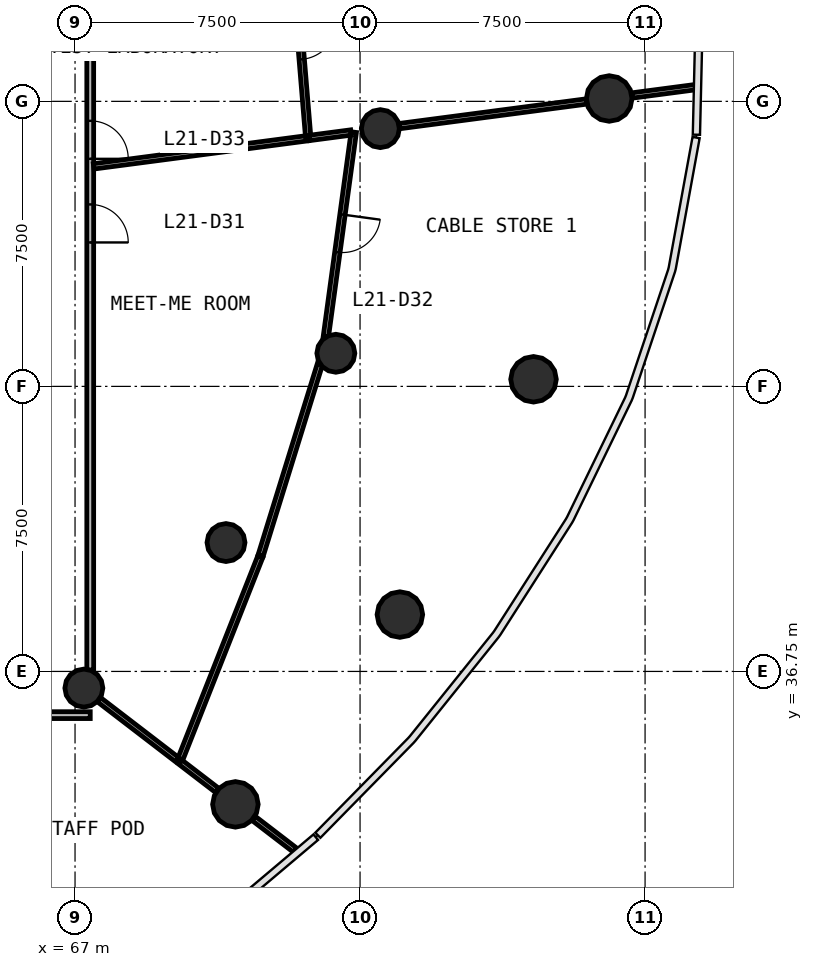
"""IFC4 building model, lengths in metres.
Left out: names, types, materials, properties, quantities, classifications, styles, units other than length and angle.
Written with IfcOpenShell. Run it as: python <this file> out.ifc"""

import sys

from ifc_helpers import new_model, si_unit, direction, frame, frame_2d, origin, origin_2d, place, context, subcontext, project, spatial, rectangle, circle, extrude, source, transform, mapped, element, fill, save


model = new_model("IFC4")
c1 = context("Model", 3, precision=1e-05, world=origin(), true_north=direction((0.0, 1.0)))
c2 = subcontext(c1, "Body", "Model", "MODEL_VIEW")
j1 = project(units=[si_unit("LENGTHUNIT", "METRE"), si_unit("PLANEANGLEUNIT", "RADIAN")], contexts=[c1])
p1 = place(None, origin())
s1 = spatial("IfcSite", under=j1, at=p1, CompositionType="ELEMENT")
p2 = place(p1, origin())
s2 = spatial("IfcBuilding", under=s1, at=p2, CompositionType="ELEMENT")
p3 = place(p2, frame((0.0, 0.0, 92.1)))
s3 = spatial("IfcBuildingStorey", under=s2, at=p3, CompositionType="ELEMENT", Elevation=92.1)
m1 = source(origin(), c2, "Body", "SweptSolid", [
    extrude(circle(Radius=0.6, at=origin_2d()), origin(), (0.0, 0.0, 1.0), 4.1),
])
for number, where, z_axis, x_axis in (
    (1, (81.056, 51.825, 0.0), (0.0, 0.0, 1.0), (1.0, 0.0, 0.0)),
    (2, (71.22, 33.252, 0.0), (0.0, 0.0, 1.0), (1.0, 0.0, 0.0)),
    (3, (75.548, 38.246, 0.0), (0.0, 0.0, 1.0), (1.0, 0.0, 0.0)),
    (4, (79.064, 44.437, 0.0), (0.0, 0.0, 1.0), (1.0, 0.0, 0.0)),
):
    element("IfcColumn", number, at=place(p3, frame(where, z_axis=z_axis, x_axis=x_axis)), inside=s3, PredefinedType="COLUMN", context=c2, shape_type="MappedRepresentation", body=[
        mapped(m1, transform((0.0, 0.0, 0.0), scale=1.0)),
    ])
m2 = source(origin(), c2, "Body", "SweptSolid", [
    extrude(circle(Radius=0.5, at=origin_2d()), origin(), (0.0, 0.0, 1.0), 4.1),
])
for number, where, z_axis, x_axis in (
    (5, (75.034, 51.032, 0.0), (0.0, 0.0, 1.0), (1.0, 0.0, 0.0)),
    (6, (67.232, 36.312, 0.0), (0.0, 0.0, 1.0), (1.0, 0.0, 0.0)),
    (7, (70.972, 40.141, 0.0), (0.0, 0.0, 1.0), (1.0, 0.0, 0.0)),
    (8, (73.863, 45.122, 0.0), (0.0, 0.0, 1.0), (1.0, 0.0, 0.0)),
):
    element("IfcColumn", number, at=place(p3, frame(where, z_axis=z_axis, x_axis=x_axis)), inside=s3, PredefinedType="COLUMN", context=c2, shape_type="MappedRepresentation", body=[
        mapped(m2, transform((0.0, 0.0, 0.0), scale=1.0)),
    ])
p4 = place(p3, frame((67.4, 35.6, 0.0), z_axis=(0.0, 0.0, 1.0), x_axis=(-1.0, 0.0, 0.0)))
e9 = element("IfcWall", 9, at=p4, inside=s3, PredefinedType="PARTITIONING", context=c2, shape_type="SweptSolid", body=[
    extrude(rectangle(XDim=30.8, YDim=0.18, at=frame_2d((15.4, 0.0))), origin(), (0.0, 0.0, 1.0), 2.9),
])
p5 = place(p4, frame((22.25, 0.0, 0.0)))
e10 = element("IfcOpeningElement", 10, at=p5, cuts=e9, PredefinedType="OPENING", context=c2, shape_type="SweptSolid", body=[
    extrude(rectangle(XDim=0.9, YDim=2.1, at=frame_2d((0.45, 1.05))), frame((0.0, 0.1, 0.0), z_axis=(0.0, -1.0, 0.0), x_axis=(1.0, 0.0, 0.0)), (0.0, 0.0, 1.0), 0.2),
])
p6 = place(p4, frame((19.65, 0.0, 0.0)))
e11 = element("IfcOpeningElement", 11, at=p6, cuts=e9, PredefinedType="OPENING", context=c2, shape_type="SweptSolid", body=[
    extrude(rectangle(XDim=0.9, YDim=2.1, at=frame_2d((0.45, 1.05))), frame((0.0, 0.1, 0.0), z_axis=(0.0, -1.0, 0.0), x_axis=(1.0, 0.0, 0.0)), (0.0, 0.0, 1.0), 0.2),
])
p7 = place(p4, frame((17.25, 0.0, 0.0)))
e12 = element("IfcOpeningElement", 12, at=p7, cuts=e9, PredefinedType="OPENING", context=c2, shape_type="SweptSolid", body=[
    extrude(rectangle(XDim=0.9, YDim=2.1, at=frame_2d((0.45, 1.05))), frame((0.0, 0.1, 0.0), z_axis=(0.0, -1.0, 0.0), x_axis=(1.0, 0.0, 0.0)), (0.0, 0.0, 1.0), 0.2),
])
p8 = place(p4, frame((14.95, 0.0, 0.0)))
e13 = element("IfcOpeningElement", 13, at=p8, cuts=e9, PredefinedType="OPENING", context=c2, shape_type="SweptSolid", body=[
    extrude(rectangle(XDim=1.0, YDim=2.1, at=frame_2d((0.5, 1.05))), frame((0.0, 0.1, 0.0), z_axis=(0.0, -1.0, 0.0), x_axis=(1.0, 0.0, 0.0)), (0.0, 0.0, 1.0), 0.2),
])
p9 = place(p4, frame((4.35, 0.0, 0.0)))
e14 = element("IfcOpeningElement", 14, at=p9, cuts=e9, PredefinedType="OPENING", context=c2, shape_type="SweptSolid", body=[
    extrude(rectangle(XDim=1.0, YDim=2.1, at=frame_2d((0.5, 1.05))), frame((0.0, 0.1, 0.0), z_axis=(0.0, -1.0, 0.0), x_axis=(1.0, 0.0, 0.0)), (0.0, 0.0, 1.0), 0.2),
])
p10 = place(p3, frame((67.4, 60.37, 0.0), z_axis=(0.0, 0.0, 1.0), x_axis=(0.0, -1.0, 0.0)))
e15 = element("IfcWall", 15, at=p10, inside=s3, PredefinedType="PARTITIONING", context=c2, shape_type="SweptSolid", body=[
    extrude(rectangle(XDim=23.583, YDim=0.18, at=frame_2d((11.791, 0.0))), origin(), (0.0, 0.0, 1.0), 2.9),
])
p11 = place(p10, frame((11.333, 0.0, 0.0)))
e16 = element("IfcOpeningElement", 16, at=p11, cuts=e15, PredefinedType="OPENING", context=c2, shape_type="SweptSolid", body=[
    extrude(rectangle(XDim=1.0, YDim=2.1, at=frame_2d((0.5, 1.05))), frame((0.0, 0.1, 0.0), z_axis=(0.0, -1.0, 0.0), x_axis=(1.0, 0.0, 0.0)), (0.0, 0.0, 1.0), 0.2),
])
p12 = place(p10, frame((9.133, 0.0, 0.0)))
e17 = element("IfcOpeningElement", 17, at=p12, cuts=e15, PredefinedType="OPENING", context=c2, shape_type="SweptSolid", body=[
    extrude(rectangle(XDim=1.0, YDim=2.1, at=frame_2d((0.5, 1.05))), frame((0.0, 0.1, 0.0), z_axis=(0.0, -1.0, 0.0), x_axis=(1.0, 0.0, 0.0)), (0.0, 0.0, 1.0), 0.2),
])
p13 = place(p3, frame((69.747, 34.382, 0.0), z_axis=(0.0, 0.0, 1.0), x_axis=(0.367316282509, 0.930096096435, 0.0)))
e18 = element("IfcWall", 18, at=p13, inside=s3, PredefinedType="PARTITIONING", context=c2, shape_type="SweptSolid", body=[
    extrude(rectangle(XDim=5.791, YDim=0.14, at=frame_2d((2.895, 0.0))), origin(), (0.0, 0.0, 1.0), 2.9),
])
p14 = place(p3, frame((67.49, 50.039, 0.0), z_axis=(0.0, 0.0, 1.0), x_axis=(0.99144553959, 0.130521040556, 0.0)))
e19 = element("IfcWall", 19, at=p14, inside=s3, PredefinedType="PARTITIONING", context=c2, shape_type="SweptSolid", body=[
    extrude(rectangle(XDim=5.696, YDim=0.14, at=frame_2d((2.848, 0.0))), origin(), (0.0, 0.0, 1.0), 2.9),
])
p15 = place(p3, frame((74.334, 50.94, 0.0), z_axis=(0.0, 0.0, 1.0), x_axis=(-0.135203344836, -0.990817872036, 0.0)))
e20 = element("IfcWall", 20, at=p15, inside=s3, PredefinedType="PARTITIONING", context=c2, shape_type="SweptSolid", body=[
    extrude(rectangle(XDim=5.439, YDim=0.14, at=frame_2d((2.719, 0.0))), origin(), (0.0, 0.0, 1.0), 2.9),
])
p16 = place(p15, frame((2.189, 0.0, 0.0)))
e21 = element("IfcOpeningElement", 21, at=p16, cuts=e20, PredefinedType="OPENING", context=c2, shape_type="SweptSolid", body=[
    extrude(rectangle(XDim=1.0, YDim=2.1, at=frame_2d((0.5, 1.05))), frame((0.0, 0.08, 0.0), z_axis=(0.0, -1.0, 0.0), x_axis=(1.0, 0.0, 0.0)), (0.0, 0.0, 1.0), 0.16),
])
p17 = place(p3, frame((71.883, 39.796, 0.0), z_axis=(0.0, 0.0, 1.0), x_axis=(0.296009313484, 0.955185053448, 0.0)))
e22 = element("IfcWall", 22, at=p17, inside=s3, PredefinedType="PARTITIONING", context=c2, shape_type="SweptSolid", body=[
    extrude(rectangle(XDim=5.279, YDim=0.14, at=frame_2d((2.639, 0.0))), origin(), (0.0, 0.0, 1.0), 2.9),
])
p18 = place(p3, frame((72.7, 56.048, 0.0), z_axis=(0.0, 0.0, 1.0), x_axis=(0.082672421763, -0.996576776109, 0.0)))
e23 = element("IfcWall", 23, at=p18, inside=s3, PredefinedType="PARTITIONING", context=c2, shape_type="SweptSolid", body=[
    extrude(rectangle(XDim=5.254, YDim=0.14, at=frame_2d((2.627, 0.0))), origin(), (0.0, 0.0, 1.0), 2.9),
])
p19 = place(p18, frame((2.204, 0.0, 0.0)))
e24 = element("IfcOpeningElement", 24, at=p19, cuts=e23, PredefinedType="OPENING", context=c2, shape_type="SweptSolid", body=[
    extrude(rectangle(XDim=1.0, YDim=2.1, at=frame_2d((0.5, 1.05))), frame((0.0, 0.08, 0.0), z_axis=(0.0, -1.0, 0.0), x_axis=(1.0, 0.0, 0.0)), (0.0, 0.0, 1.0), 0.16),
])
p20 = place(p3, frame((75.534, 51.098, 0.0), z_axis=(0.0, 0.0, 1.0), x_axis=(0.991443414541, 0.130537181533, 0.0)))
e25 = element("IfcWall", 25, at=p20, inside=s3, PredefinedType="PARTITIONING", context=c2, shape_type="SweptSolid", body=[
    extrude(rectangle(XDim=4.966, YDim=0.14, at=frame_2d((2.483, 0.0))), origin(), (0.0, 0.0, 1.0), 2.9),
])
p21 = place(p3, frame((67.633, 36.005, 0.0), z_axis=(0.0, 0.0, 1.0), x_axis=(0.793386534399, -0.608718167164, 0.0)))
e26 = element("IfcWall", 26, at=p21, inside=s3, PredefinedType="PARTITIONING", context=c2, shape_type="SweptSolid", body=[
    extrude(rectangle(XDim=2.593, YDim=0.14, at=frame_2d((1.296, 0.0))), origin(), (0.0, 0.0, 1.0), 2.9),
])
p22 = place(p3, frame((81.656, 51.904, 0.0), z_axis=(0.0, 0.0, 1.0), x_axis=(0.991450373449, 0.130484317017, 0.0)))
e27 = element("IfcWall", 27, at=p22, inside=s3, PredefinedType="PARTITIONING", context=c2, shape_type="SweptSolid", body=[
    extrude(rectangle(XDim=1.695, YDim=0.14, at=frame_2d((0.848, 0.0))), origin(), (0.0, 0.0, 1.0), 2.9),
])
p23 = place(p3, frame((71.699, 32.884, 0.0), z_axis=(0.0, 0.0, 1.0), x_axis=(0.793327210849, -0.608795480047, 0.0)))
e28 = element("IfcWall", 28, at=p23, inside=s3, PredefinedType="PARTITIONING", context=c2, shape_type="SweptSolid", body=[
    extrude(rectangle(XDim=1.38, YDim=0.14, at=frame_2d((0.69, 0.0))), origin(), (0.0, 0.0, 1.0), 2.9),
])
p24 = place(p3, frame((69.771, 34.364, 0.0), z_axis=(0.0, 0.0, 1.0), x_axis=(0.793284637014, -0.608850954403, 0.0)))
e29 = element("IfcWall", 29, at=p24, inside=s3, PredefinedType="PARTITIONING", context=c2, shape_type="SweptSolid", body=[
    extrude(rectangle(XDim=1.222, YDim=0.14, at=frame_2d((0.611, 0.0))), origin(), (0.0, 0.0, 1.0), 2.9),
])
p25 = place(p3, frame((73.167, 50.787, 0.0), z_axis=(0.0, 0.0, 1.0), x_axis=(0.991440755943, 0.130557372273, 0.0)))
e30 = element("IfcWall", 30, at=p25, inside=s3, PredefinedType="PARTITIONING", context=c2, shape_type="SweptSolid", body=[
    extrude(rectangle(XDim=1.105, YDim=0.14, at=frame_2d((0.553, 0.0))), origin(), (0.0, 0.0, 1.0), 2.9),
])
m3 = source(origin(), c2, "Body", "SweptSolid", [
    extrude(rectangle(XDim=1.0, YDim=2.1, at=frame_2d((0.5, 1.05))), frame((0.0, 0.025, 0.0), z_axis=(0.0, -1.0, 0.0), x_axis=(1.0, 0.0, 0.0)), (0.0, 0.0, 1.0), 0.05),
])
p26 = place(p11, origin())
e31 = element("IfcDoor", 31, at=p26, inside=s3, OperationType="SINGLE_SWING_RIGHT", PredefinedType="DOOR", context=c2, shape_type="MappedRepresentation", body=[
    mapped(m3, transform((0.0, 0.0, 0.0), scale=1.0)),
])
fill(e16, e31)
p27 = place(p16, origin())
e32 = element("IfcDoor", 32, at=p27, inside=s3, OperationType="SINGLE_SWING_LEFT", PredefinedType="DOOR", context=c2, shape_type="MappedRepresentation", body=[
    mapped(m3, transform((0.0, 0.0, 0.0), scale=1.0)),
])
fill(e21, e32)
p28 = place(p12, origin())
e33 = element("IfcDoor", 33, at=p28, inside=s3, OperationType="SINGLE_SWING_RIGHT", PredefinedType="DOOR", context=c2, shape_type="MappedRepresentation", body=[
    mapped(m3, transform((0.0, 0.0, 0.0), scale=1.0)),
])
fill(e17, e33)
p29 = place(p19, origin())
e34 = element("IfcDoor", 34, at=p29, inside=s3, OperationType="SINGLE_SWING_LEFT", PredefinedType="DOOR", context=c2, shape_type="MappedRepresentation", body=[
    mapped(m3, transform((0.0, 0.0, 0.0), scale=1.0)),
])
fill(e24, e34)
save(model, sys.argv[1])
